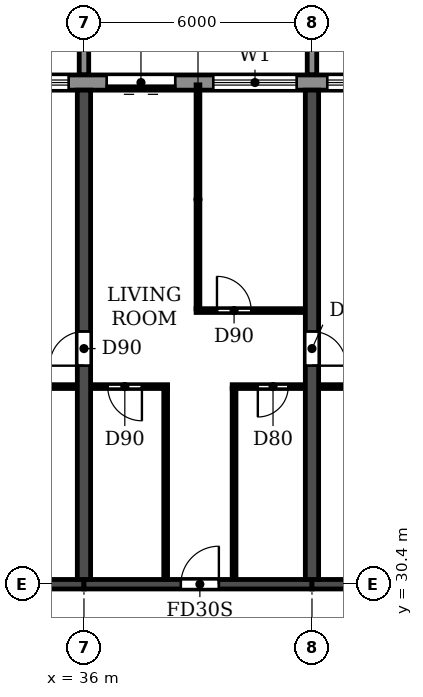
"""IFC4 building model, lengths in metres.
Left out: names, types, materials, properties, quantities, classifications, styles, units other than length and angle.
Written with IfcOpenShell. Run it as: python <this file> out.ifc"""

import sys

from ifc_helpers import new_model, si_unit, direction, frame, frame_2d, origin, place, context, subcontext, project, spatial, polyline, rectangle, outline, extrude, source, transform, mapped, element, fill, save


model = new_model("IFC4")
c1 = context("Model", 3, precision=1e-05, world=origin(), true_north=direction((0.0, 1.0)))
c2 = subcontext(c1, "Body", "Model", "MODEL_VIEW")
j1 = project(units=[si_unit("LENGTHUNIT", "METRE"), si_unit("PLANEANGLEUNIT", "RADIAN")], contexts=[c1])
p1 = place(None, origin())
s1 = spatial("IfcSite", under=j1, at=p1, CompositionType="ELEMENT")
p2 = place(p1, origin())
s2 = spatial("IfcBuilding", under=s1, at=p2, CompositionType="ELEMENT")
p3 = place(p2, frame((0.0, 0.0, 92.7)))
s3 = spatial("IfcBuildingStorey", under=s2, at=p3, CompositionType="ELEMENT", Elevation=92.7)
p4 = place(p3, frame((36.0, 30.525, 0.0), z_axis=(0.0, 0.0, 1.0), x_axis=(0.0, 1.0, 0.0)))
e1 = element("IfcWall", 1, at=p4, inside=s3, PredefinedType="SHEAR", context=c2, shape_type="SweptSolid", body=[
    extrude(rectangle(XDim=12.875, YDim=0.35, at=frame_2d((6.438, 0.0))), origin(), (0.0, 0.0, 1.0), 3.06),
])
p5 = place(p4, frame((5.625, 0.0, 0.0)))
e2 = element("IfcOpeningElement", 2, at=p5, cuts=e1, PredefinedType="OPENING", context=c2, shape_type="SweptSolid", body=[
    extrude(rectangle(XDim=0.9, YDim=2.1, at=frame_2d((0.45, 1.05))), frame((0.0, 0.185, 0.0), z_axis=(0.0, -1.0, 0.0), x_axis=(1.0, 0.0, 0.0)), (0.0, 0.0, 1.0), 0.37),
])
p6 = place(p3, frame((42.0, 30.525, 0.0), z_axis=(0.0, 0.0, 1.0), x_axis=(0.0, 1.0, 0.0)))
e3 = element("IfcWall", 3, at=p6, inside=s3, PredefinedType="SHEAR", context=c2, shape_type="SweptSolid", body=[
    extrude(rectangle(XDim=12.875, YDim=0.35, at=frame_2d((6.438, 0.0))), origin(), (0.0, 0.0, 1.0), 3.06),
])
p7 = place(p6, frame((5.625, 0.0, 0.0)))
e4 = element("IfcOpeningElement", 4, at=p7, cuts=e3, PredefinedType="OPENING", context=c2, shape_type="SweptSolid", body=[
    extrude(rectangle(XDim=0.9, YDim=2.1, at=frame_2d((0.45, 1.05))), frame((0.0, 0.185, 0.0), z_axis=(0.0, -1.0, 0.0), x_axis=(1.0, 0.0, 0.0)), (0.0, 0.0, 1.0), 0.37),
])
p8 = place(p3, frame((30.0, 30.4, 0.0), z_axis=(0.0, 0.0, 1.0), x_axis=(1.0, 0.0, 0.0)))
e5 = element("IfcWall", 5, at=p8, inside=s3, PredefinedType="SHEAR", context=c2, shape_type="SweptSolid", body=[
    extrude(rectangle(XDim=6.0, YDim=0.25, at=frame_2d((3.0, 0.0))), origin(), (0.0, 0.0, 1.0), 2.46),
])
p9 = place(p3, frame((36.0, 30.4, 0.0), z_axis=(0.0, 0.0, 1.0), x_axis=(1.0, 0.0, 0.0)))
e6 = element("IfcWall", 6, at=p9, inside=s3, PredefinedType="SHEAR", context=c2, shape_type="SweptSolid", body=[
    extrude(rectangle(XDim=6.0, YDim=0.25, at=frame_2d((3.0, 0.0))), origin(), (0.0, 0.0, 1.0), 2.46),
])
p10 = place(p9, frame((2.55, 0.0, 0.0)))
e7 = element("IfcOpeningElement", 7, at=p10, cuts=e6, PredefinedType="OPENING", context=c2, shape_type="SweptSolid", body=[
    extrude(rectangle(XDim=1.0, YDim=2.1, at=frame_2d((0.5, 1.05))), frame((0.0, 0.135, 0.0), z_axis=(0.0, -1.0, 0.0), x_axis=(1.0, 0.0, 0.0)), (0.0, 0.0, 1.0), 0.27),
])
p11 = place(p3, frame((42.0, 30.4, 0.0), z_axis=(0.0, 0.0, 1.0), x_axis=(1.0, 0.0, 0.0)))
e8 = element("IfcWall", 8, at=p11, inside=s3, PredefinedType="SHEAR", context=c2, shape_type="SweptSolid", body=[
    extrude(rectangle(XDim=6.0, YDim=0.25, at=frame_2d((3.0, 0.0))), origin(), (0.0, 0.0, 1.0), 2.46),
])
p12 = place(p3, frame((91.317, 43.6, 0.0), z_axis=(0.0, 0.0, 1.0), x_axis=(-1.0, 0.0, 0.0)))
e9 = element("IfcWall", 9, at=p12, inside=s3, PredefinedType="STANDARD", context=c2, shape_type="SweptSolid", body=[
    extrude(rectangle(XDim=80.634, YDim=0.4, at=frame_2d((40.317, 0.0))), origin(), (0.0, 0.0, 1.0), 3.06),
])
p13 = place(p12, frame((76.717, 0.0, 0.9)))
e10 = element("IfcOpeningElement", 10, at=p13, cuts=e9, PredefinedType="OPENING", context=c2, shape_type="SweptSolid", body=[
    extrude(rectangle(XDim=2.2, YDim=1.5, at=frame_2d((1.1, 0.75))), frame((0.0, 0.21, 0.0), z_axis=(0.0, -1.0, 0.0), x_axis=(1.0, 0.0, 0.0)), (0.0, 0.0, 1.0), 0.42),
])
p14 = place(p12, frame((73.917, 0.0, 0.0)))
e11 = element("IfcOpeningElement", 11, at=p14, cuts=e9, PredefinedType="OPENING", context=c2, shape_type="SweptSolid", body=[
    extrude(rectangle(XDim=1.8, YDim=2.4, at=frame_2d((0.9, 1.2))), frame((0.0, 0.21, 0.0), z_axis=(0.0, -1.0, 0.0), x_axis=(1.0, 0.0, 0.0)), (0.0, 0.0, 1.0), 0.42),
])
p15 = place(p12, frame((70.717, 0.0, 0.9)))
e12 = element("IfcOpeningElement", 12, at=p15, cuts=e9, PredefinedType="OPENING", context=c2, shape_type="SweptSolid", body=[
    extrude(rectangle(XDim=2.2, YDim=1.5, at=frame_2d((1.1, 0.75))), frame((0.0, 0.21, 0.0), z_axis=(0.0, -1.0, 0.0), x_axis=(1.0, 0.0, 0.0)), (0.0, 0.0, 1.0), 0.42),
])
p16 = place(p12, frame((67.717, 0.0, 0.9)))
e13 = element("IfcOpeningElement", 13, at=p16, cuts=e9, PredefinedType="OPENING", context=c2, shape_type="SweptSolid", body=[
    extrude(rectangle(XDim=2.2, YDim=1.5, at=frame_2d((1.1, 0.75))), frame((0.0, 0.21, 0.0), z_axis=(0.0, -1.0, 0.0), x_axis=(1.0, 0.0, 0.0)), (0.0, 0.0, 1.0), 0.42),
])
p17 = place(p12, frame((64.717, 0.0, 0.9)))
e14 = element("IfcOpeningElement", 14, at=p17, cuts=e9, PredefinedType="OPENING", context=c2, shape_type="SweptSolid", body=[
    extrude(rectangle(XDim=2.2, YDim=1.5, at=frame_2d((1.1, 0.75))), frame((0.0, 0.21, 0.0), z_axis=(0.0, -1.0, 0.0), x_axis=(1.0, 0.0, 0.0)), (0.0, 0.0, 1.0), 0.42),
])
p18 = place(p12, frame((61.917, 0.0, 0.0)))
e15 = element("IfcOpeningElement", 15, at=p18, cuts=e9, PredefinedType="OPENING", context=c2, shape_type="SweptSolid", body=[
    extrude(rectangle(XDim=1.8, YDim=2.4, at=frame_2d((0.9, 1.2))), frame((0.0, 0.21, 0.0), z_axis=(0.0, -1.0, 0.0), x_axis=(1.0, 0.0, 0.0)), (0.0, 0.0, 1.0), 0.42),
])
p19 = place(p12, frame((58.717, 0.0, 0.9)))
e16 = element("IfcOpeningElement", 16, at=p19, cuts=e9, PredefinedType="OPENING", context=c2, shape_type="SweptSolid", body=[
    extrude(rectangle(XDim=2.2, YDim=1.5, at=frame_2d((1.1, 0.75))), frame((0.0, 0.21, 0.0), z_axis=(0.0, -1.0, 0.0), x_axis=(1.0, 0.0, 0.0)), (0.0, 0.0, 1.0), 0.42),
])
p20 = place(p12, frame((55.717, 0.0, 0.9)))
e17 = element("IfcOpeningElement", 17, at=p20, cuts=e9, PredefinedType="OPENING", context=c2, shape_type="SweptSolid", body=[
    extrude(rectangle(XDim=2.2, YDim=1.5, at=frame_2d((1.1, 0.75))), frame((0.0, 0.21, 0.0), z_axis=(0.0, -1.0, 0.0), x_axis=(1.0, 0.0, 0.0)), (0.0, 0.0, 1.0), 0.42),
])
p21 = place(p12, frame((52.917, 0.0, 0.0)))
e18 = element("IfcOpeningElement", 18, at=p21, cuts=e9, PredefinedType="OPENING", context=c2, shape_type="SweptSolid", body=[
    extrude(rectangle(XDim=1.8, YDim=2.4, at=frame_2d((0.9, 1.2))), frame((0.0, 0.21, 0.0), z_axis=(0.0, -1.0, 0.0), x_axis=(1.0, 0.0, 0.0)), (0.0, 0.0, 1.0), 0.42),
])
p22 = place(p12, frame((49.717, 0.0, 0.9)))
e19 = element("IfcOpeningElement", 19, at=p22, cuts=e9, PredefinedType="OPENING", context=c2, shape_type="SweptSolid", body=[
    extrude(rectangle(XDim=2.2, YDim=1.5, at=frame_2d((1.1, 0.75))), frame((0.0, 0.21, 0.0), z_axis=(0.0, -1.0, 0.0), x_axis=(1.0, 0.0, 0.0)), (0.0, 0.0, 1.0), 0.42),
])
p23 = place(p12, frame((46.717, 0.0, 0.9)))
e20 = element("IfcOpeningElement", 20, at=p23, cuts=e9, PredefinedType="OPENING", context=c2, shape_type="SweptSolid", body=[
    extrude(rectangle(XDim=2.2, YDim=1.5, at=frame_2d((1.1, 0.75))), frame((0.0, 0.21, 0.0), z_axis=(0.0, -1.0, 0.0), x_axis=(1.0, 0.0, 0.0)), (0.0, 0.0, 1.0), 0.42),
])
p24 = place(p12, frame((43.717, 0.0, 0.9)))
e21 = element("IfcOpeningElement", 21, at=p24, cuts=e9, PredefinedType="OPENING", context=c2, shape_type="SweptSolid", body=[
    extrude(rectangle(XDim=2.2, YDim=1.5, at=frame_2d((1.1, 0.75))), frame((0.0, 0.21, 0.0), z_axis=(0.0, -1.0, 0.0), x_axis=(1.0, 0.0, 0.0)), (0.0, 0.0, 1.0), 0.42),
])
p25 = place(p12, frame((40.717, 0.0, 0.9)))
e22 = element("IfcOpeningElement", 22, at=p25, cuts=e9, PredefinedType="OPENING", context=c2, shape_type="SweptSolid", body=[
    extrude(rectangle(XDim=2.2, YDim=1.5, at=frame_2d((1.1, 0.75))), frame((0.0, 0.21, 0.0), z_axis=(0.0, -1.0, 0.0), x_axis=(1.0, 0.0, 0.0)), (0.0, 0.0, 1.0), 0.42),
])
p26 = place(p12, frame((37.917, 0.0, 0.0)))
e23 = element("IfcOpeningElement", 23, at=p26, cuts=e9, PredefinedType="OPENING", context=c2, shape_type="SweptSolid", body=[
    extrude(rectangle(XDim=1.8, YDim=2.4, at=frame_2d((0.9, 1.2))), frame((0.0, 0.21, 0.0), z_axis=(0.0, -1.0, 0.0), x_axis=(1.0, 0.0, 0.0)), (0.0, 0.0, 1.0), 0.42),
])
p27 = place(p12, frame((34.917, 0.0, 0.0)))
e24 = element("IfcOpeningElement", 24, at=p27, cuts=e9, PredefinedType="OPENING", context=c2, shape_type="SweptSolid", body=[
    extrude(rectangle(XDim=1.8, YDim=2.4, at=frame_2d((0.9, 1.2))), frame((0.0, 0.21, 0.0), z_axis=(0.0, -1.0, 0.0), x_axis=(1.0, 0.0, 0.0)), (0.0, 0.0, 1.0), 0.42),
])
p28 = place(p12, frame((31.717, 0.0, 0.9)))
e25 = element("IfcOpeningElement", 25, at=p28, cuts=e9, PredefinedType="OPENING", context=c2, shape_type="SweptSolid", body=[
    extrude(rectangle(XDim=2.2, YDim=1.5, at=frame_2d((1.1, 0.75))), frame((0.0, 0.21, 0.0), z_axis=(0.0, -1.0, 0.0), x_axis=(1.0, 0.0, 0.0)), (0.0, 0.0, 1.0), 0.42),
])
p29 = place(p12, frame((28.717, 0.0, 0.9)))
e26 = element("IfcOpeningElement", 26, at=p29, cuts=e9, PredefinedType="OPENING", context=c2, shape_type="SweptSolid", body=[
    extrude(rectangle(XDim=2.2, YDim=1.5, at=frame_2d((1.1, 0.75))), frame((0.0, 0.21, 0.0), z_axis=(0.0, -1.0, 0.0), x_axis=(1.0, 0.0, 0.0)), (0.0, 0.0, 1.0), 0.42),
])
p30 = place(p12, frame((25.717, 0.0, 0.9)))
e27 = element("IfcOpeningElement", 27, at=p30, cuts=e9, PredefinedType="OPENING", context=c2, shape_type="SweptSolid", body=[
    extrude(rectangle(XDim=2.2, YDim=1.5, at=frame_2d((1.1, 0.75))), frame((0.0, 0.21, 0.0), z_axis=(0.0, -1.0, 0.0), x_axis=(1.0, 0.0, 0.0)), (0.0, 0.0, 1.0), 0.42),
])
p31 = place(p12, frame((22.717, 0.0, 0.9)))
e28 = element("IfcOpeningElement", 28, at=p31, cuts=e9, PredefinedType="OPENING", context=c2, shape_type="SweptSolid", body=[
    extrude(rectangle(XDim=2.2, YDim=1.5, at=frame_2d((1.1, 0.75))), frame((0.0, 0.21, 0.0), z_axis=(0.0, -1.0, 0.0), x_axis=(1.0, 0.0, 0.0)), (0.0, 0.0, 1.0), 0.42),
])
p32 = place(p12, frame((19.917, 0.0, 0.0)))
e29 = element("IfcOpeningElement", 29, at=p32, cuts=e9, PredefinedType="OPENING", context=c2, shape_type="SweptSolid", body=[
    extrude(rectangle(XDim=1.8, YDim=2.4, at=frame_2d((0.9, 1.2))), frame((0.0, 0.21, 0.0), z_axis=(0.0, -1.0, 0.0), x_axis=(1.0, 0.0, 0.0)), (0.0, 0.0, 1.0), 0.42),
])
p33 = place(p12, frame((16.717, 0.0, 0.9)))
e30 = element("IfcOpeningElement", 30, at=p33, cuts=e9, PredefinedType="OPENING", context=c2, shape_type="SweptSolid", body=[
    extrude(rectangle(XDim=2.2, YDim=1.5, at=frame_2d((1.1, 0.75))), frame((0.0, 0.21, 0.0), z_axis=(0.0, -1.0, 0.0), x_axis=(1.0, 0.0, 0.0)), (0.0, 0.0, 1.0), 0.42),
])
p34 = place(p12, frame((13.917, 0.0, 0.0)))
e31 = element("IfcOpeningElement", 31, at=p34, cuts=e9, PredefinedType="OPENING", context=c2, shape_type="SweptSolid", body=[
    extrude(rectangle(XDim=1.8, YDim=2.4, at=frame_2d((0.9, 1.2))), frame((0.0, 0.21, 0.0), z_axis=(0.0, -1.0, 0.0), x_axis=(1.0, 0.0, 0.0)), (0.0, 0.0, 1.0), 0.42),
])
p35 = place(p12, frame((10.717, 0.0, 0.9)))
e32 = element("IfcOpeningElement", 32, at=p35, cuts=e9, PredefinedType="OPENING", context=c2, shape_type="SweptSolid", body=[
    extrude(rectangle(XDim=2.2, YDim=1.5, at=frame_2d((1.1, 0.75))), frame((0.0, 0.21, 0.0), z_axis=(0.0, -1.0, 0.0), x_axis=(1.0, 0.0, 0.0)), (0.0, 0.0, 1.0), 0.42),
])
p36 = place(p12, frame((7.917, 0.0, 0.0)))
e33 = element("IfcOpeningElement", 33, at=p36, cuts=e9, PredefinedType="OPENING", context=c2, shape_type="SweptSolid", body=[
    extrude(rectangle(XDim=1.8, YDim=2.4, at=frame_2d((0.9, 1.2))), frame((0.0, 0.21, 0.0), z_axis=(0.0, -1.0, 0.0), x_axis=(1.0, 0.0, 0.0)), (0.0, 0.0, 1.0), 0.42),
])
p37 = place(p12, frame((4.717, 0.0, 0.9)))
e34 = element("IfcOpeningElement", 34, at=p37, cuts=e9, PredefinedType="OPENING", context=c2, shape_type="SweptSolid", body=[
    extrude(rectangle(XDim=2.2, YDim=1.5, at=frame_2d((1.1, 0.75))), frame((0.0, 0.21, 0.0), z_axis=(0.0, -1.0, 0.0), x_axis=(1.0, 0.0, 0.0)), (0.0, 0.0, 1.0), 0.42),
])
p38 = place(p12, frame((1.917, 0.0, 0.0)))
e35 = element("IfcOpeningElement", 35, at=p38, cuts=e9, PredefinedType="OPENING", context=c2, shape_type="SweptSolid", body=[
    extrude(rectangle(XDim=1.8, YDim=2.4, at=frame_2d((0.9, 1.2))), frame((0.0, 0.21, 0.0), z_axis=(0.0, -1.0, 0.0), x_axis=(1.0, 0.0, 0.0)), (0.0, 0.0, 1.0), 0.42),
])
m1 = source(origin(), c2, "Body", "SweptSolid", [
    extrude(outline(polyline([(0.0, 0.0), (0.25, 0.0), (0.25, 3.1), (0.0, 3.1), (0.0, 0.0)])), origin(), (0.0, 0.0, 1.0), 3.1),
])
for number, where in (
    (36, (35.875, 43.8, 0.0)),
    (37, (41.875, 43.8, 0.0)),
):
    element("IfcWall", number, at=place(p3, frame(where)), inside=s3, PredefinedType="STANDARD", context=c2, shape_type="MappedRepresentation", body=[
        mapped(m1, transform((0.0, 0.0, 0.0))),
    ])
p39 = place(p3, frame((33.1, 35.6, 0.0), z_axis=(0.0, 0.0, 1.0), x_axis=(1.0, 0.0, 0.0)))
e38 = element("IfcWall", 38, at=p39, inside=s3, PredefinedType="PARTITIONING", context=c2, shape_type="SweptSolid", body=[
    extrude(rectangle(XDim=2.715, YDim=0.1, at=frame_2d((1.357, 0.0))), origin(), (0.0, 0.0, 1.0), 3.06),
])
p40 = place(p39, frame((1.0, 0.0, 0.0)))
e39 = element("IfcOpeningElement", 39, at=p40, cuts=e38, PredefinedType="OPENING", context=c2, shape_type="SweptSolid", body=[
    extrude(rectangle(XDim=0.8, YDim=2.1, at=frame_2d((0.4, 1.05))), frame((0.0, 0.06, 0.0), z_axis=(0.0, -1.0, 0.0), x_axis=(1.0, 0.0, 0.0)), (0.0, 0.0, 1.0), 0.12),
])
p41 = place(p3, frame((36.185, 35.6, 0.0), z_axis=(0.0, 0.0, 1.0), x_axis=(1.0, 0.0, 0.0)))
e40 = element("IfcWall", 40, at=p41, inside=s3, PredefinedType="PARTITIONING", context=c2, shape_type="SweptSolid", body=[
    extrude(rectangle(XDim=2.015, YDim=0.1, at=frame_2d((1.007, 0.0))), origin(), (0.0, 0.0, 1.0), 3.06),
])
p42 = place(p41, frame((0.44, 0.0, 0.0)))
e41 = element("IfcOpeningElement", 41, at=p42, cuts=e40, PredefinedType="OPENING", context=c2, shape_type="SweptSolid", body=[
    extrude(rectangle(XDim=0.9, YDim=2.1, at=frame_2d((0.45, 1.05))), frame((0.0, 0.06, 0.0), z_axis=(0.0, -1.0, 0.0), x_axis=(1.0, 0.0, 0.0)), (0.0, 0.0, 1.0), 0.12),
])
p43 = place(p3, frame((39.9, 35.6, 0.0), z_axis=(0.0, 0.0, 1.0), x_axis=(1.0, 0.0, 0.0)))
e42 = element("IfcWall", 42, at=p43, inside=s3, PredefinedType="PARTITIONING", context=c2, shape_type="SweptSolid", body=[
    extrude(rectangle(XDim=1.915, YDim=0.1, at=frame_2d((0.958, 0.0))), origin(), (0.0, 0.0, 1.0), 3.06),
])
p44 = place(p43, frame((0.675, 0.0, 0.0)))
e43 = element("IfcOpeningElement", 43, at=p44, cuts=e42, PredefinedType="OPENING", context=c2, shape_type="SweptSolid", body=[
    extrude(rectangle(XDim=0.8, YDim=2.1, at=frame_2d((0.4, 1.05))), frame((0.0, 0.06, 0.0), z_axis=(0.0, -1.0, 0.0), x_axis=(1.0, 0.0, 0.0)), (0.0, 0.0, 1.0), 0.12),
])
p45 = place(p3, frame((42.185, 35.6, 0.0), z_axis=(0.0, 0.0, 1.0), x_axis=(1.0, 0.0, 0.0)))
e44 = element("IfcWall", 44, at=p45, inside=s3, PredefinedType="PARTITIONING", context=c2, shape_type="SweptSolid", body=[
    extrude(rectangle(XDim=2.715, YDim=0.1, at=frame_2d((1.357, 0.0))), origin(), (0.0, 0.0, 1.0), 3.06),
])
p46 = place(p45, frame((0.915, 0.0, 0.0)))
e45 = element("IfcOpeningElement", 45, at=p46, cuts=e44, PredefinedType="OPENING", context=c2, shape_type="SweptSolid", body=[
    extrude(rectangle(XDim=0.8, YDim=2.1, at=frame_2d((0.4, 1.05))), frame((0.0, 0.06, 0.0), z_axis=(0.0, -1.0, 0.0), x_axis=(1.0, 0.0, 0.0)), (0.0, 0.0, 1.0), 0.12),
])
p47 = place(p3, frame((38.95, 37.6, 0.0), z_axis=(0.0, 0.0, 1.0), x_axis=(1.0, 0.0, 0.0)))
e46 = element("IfcWall", 46, at=p47, inside=s3, PredefinedType="PARTITIONING", context=c2, shape_type="SweptSolid", body=[
    extrude(rectangle(XDim=2.865, YDim=0.1, at=frame_2d((1.433, 0.0))), origin(), (0.0, 0.0, 1.0), 3.06),
])
p48 = place(p47, frame((0.55, 0.0, 0.0)))
e47 = element("IfcOpeningElement", 47, at=p48, cuts=e46, PredefinedType="OPENING", context=c2, shape_type="SweptSolid", body=[
    extrude(rectangle(XDim=0.9, YDim=2.1, at=frame_2d((0.45, 1.05))), frame((0.0, 0.06, 0.0), z_axis=(0.0, -1.0, 0.0), x_axis=(1.0, 0.0, 0.0)), (0.0, 0.0, 1.0), 0.12),
])
p49 = place(p3, frame((38.15, 30.535, 0.0), z_axis=(0.0, 0.0, 1.0), x_axis=(0.0, 1.0, 0.0)))
e48 = element("IfcWall", 48, at=p49, inside=s3, PredefinedType="PARTITIONING", context=c2, shape_type="SweptSolid", body=[
    extrude(rectangle(XDim=5.015, YDim=0.1, at=frame_2d((2.508, 0.0))), origin(), (0.0, 0.0, 1.0), 3.06),
])
p50 = place(p3, frame((39.0, 37.65, 0.0), z_axis=(0.0, 0.0, 1.0), x_axis=(0.0, 1.0, 0.0)))
e49 = element("IfcWall", 49, at=p50, inside=s3, PredefinedType="PARTITIONING", context=c2, shape_type="SweptSolid", body=[
    extrude(rectangle(XDim=5.89, YDim=0.1, at=frame_2d((2.945, 0.0))), origin(), (0.0, 0.0, 1.0), 3.06),
])
p51 = place(p3, frame((39.95, 30.535, 0.0), z_axis=(0.0, 0.0, 1.0), x_axis=(0.0, 1.0, 0.0)))
e50 = element("IfcWall", 50, at=p51, inside=s3, PredefinedType="PARTITIONING", context=c2, shape_type="SweptSolid", body=[
    extrude(rectangle(XDim=5.015, YDim=0.1, at=frame_2d((2.508, 0.0))), origin(), (0.0, 0.0, 1.0), 3.06),
])
p52 = place(p20, origin())
e51 = element("IfcWindow", 51, at=p52, inside=s3, PartitioningType="DOUBLE_PANEL_HORIZONTAL", PredefinedType="WINDOW", context=c2, shape_type="SweptSolid", body=[
    extrude(rectangle(XDim=2.2, YDim=1.5, at=frame_2d((1.1, 0.75))), frame((0.0, 0.03, 0.0), z_axis=(0.0, -1.0, 0.0), x_axis=(1.0, 0.0, 0.0)), (0.0, 0.0, 1.0), 0.06),
])
fill(e17, e51)
p53 = place(p21, origin())
e52 = element("IfcDoor", 52, at=p53, inside=s3, OperationType="DOUBLE_DOOR_SLIDING", PredefinedType="DOOR", context=c2, shape_type="SweptSolid", body=[
    extrude(rectangle(XDim=1.8, YDim=2.4, at=frame_2d((0.9, 1.2))), frame((0.0, 0.025, 0.0), z_axis=(0.0, -1.0, 0.0), x_axis=(1.0, 0.0, 0.0)), (0.0, 0.0, 1.0), 0.05),
])
fill(e18, e52)
p54 = place(p22, origin())
e53 = element("IfcWindow", 53, at=p54, inside=s3, PartitioningType="DOUBLE_PANEL_HORIZONTAL", PredefinedType="WINDOW", context=c2, shape_type="SweptSolid", body=[
    extrude(rectangle(XDim=2.2, YDim=1.5, at=frame_2d((1.1, 0.75))), frame((0.0, 0.03, 0.0), z_axis=(0.0, -1.0, 0.0), x_axis=(1.0, 0.0, 0.0)), (0.0, 0.0, 1.0), 0.06),
])
fill(e19, e53)
p55 = place(p23, origin())
e54 = element("IfcWindow", 54, at=p55, inside=s3, PartitioningType="DOUBLE_PANEL_HORIZONTAL", PredefinedType="WINDOW", context=c2, shape_type="SweptSolid", body=[
    extrude(rectangle(XDim=2.2, YDim=1.5, at=frame_2d((1.1, 0.75))), frame((0.0, 0.03, 0.0), z_axis=(0.0, -1.0, 0.0), x_axis=(1.0, 0.0, 0.0)), (0.0, 0.0, 1.0), 0.06),
])
fill(e20, e54)
p56 = place(p5, origin())
e55 = element("IfcDoor", 55, at=p56, inside=s3, OperationType="SINGLE_SWING_LEFT", PredefinedType="DOOR", context=c2, shape_type="SweptSolid", body=[
    extrude(rectangle(XDim=0.9, YDim=2.1, at=frame_2d((0.45, 1.05))), frame((0.0, 0.025, 0.0), z_axis=(0.0, -1.0, 0.0), x_axis=(1.0, 0.0, 0.0)), (0.0, 0.0, 1.0), 0.05),
])
fill(e2, e55)
p57 = place(p42, frame((0.9, 0.0, 0.0), z_axis=(0.0, 0.0, 1.0), x_axis=(-1.0, 0.0, 0.0)))
e56 = element("IfcDoor", 56, at=p57, inside=s3, OperationType="SINGLE_SWING_LEFT", PredefinedType="DOOR", context=c2, shape_type="SweptSolid", body=[
    extrude(rectangle(XDim=0.9, YDim=2.1, at=frame_2d((0.45, 1.05))), frame((0.0, 0.025, 0.0), z_axis=(0.0, -1.0, 0.0), x_axis=(1.0, 0.0, 0.0)), (0.0, 0.0, 1.0), 0.05),
])
fill(e41, e56)
p58 = place(p10, origin())
e57 = element("IfcDoor", 57, at=p58, inside=s3, OperationType="SINGLE_SWING_RIGHT", PredefinedType="DOOR", context=c2, shape_type="SweptSolid", body=[
    extrude(rectangle(XDim=1.0, YDim=2.1, at=frame_2d((0.5, 1.05))), frame((0.0, 0.025, 0.0), z_axis=(0.0, -1.0, 0.0), x_axis=(1.0, 0.0, 0.0)), (0.0, 0.0, 1.0), 0.05),
])
fill(e7, e57)
p59 = place(p48, origin())
e58 = element("IfcDoor", 58, at=p59, inside=s3, OperationType="SINGLE_SWING_LEFT", PredefinedType="DOOR", context=c2, shape_type="SweptSolid", body=[
    extrude(rectangle(XDim=0.9, YDim=2.1, at=frame_2d((0.45, 1.05))), frame((0.0, 0.025, 0.0), z_axis=(0.0, -1.0, 0.0), x_axis=(1.0, 0.0, 0.0)), (0.0, 0.0, 1.0), 0.05),
])
fill(e47, e58)
p60 = place(p44, frame((0.8, 0.0, 0.0), z_axis=(0.0, 0.0, 1.0), x_axis=(-1.0, 0.0, 0.0)))
e59 = element("IfcDoor", 59, at=p60, inside=s3, OperationType="SINGLE_SWING_RIGHT", PredefinedType="DOOR", context=c2, shape_type="SweptSolid", body=[
    extrude(rectangle(XDim=0.8, YDim=2.1, at=frame_2d((0.4, 1.05))), frame((0.0, 0.025, 0.0), z_axis=(0.0, -1.0, 0.0), x_axis=(1.0, 0.0, 0.0)), (0.0, 0.0, 1.0), 0.05),
])
fill(e43, e59)
p61 = place(p7, frame((0.9, 0.0, 0.0), z_axis=(0.0, 0.0, 1.0), x_axis=(-1.0, 0.0, 0.0)))
e60 = element("IfcDoor", 60, at=p61, inside=s3, OperationType="SINGLE_SWING_RIGHT", PredefinedType="DOOR", context=c2, shape_type="SweptSolid", body=[
    extrude(rectangle(XDim=0.9, YDim=2.1, at=frame_2d((0.45, 1.05))), frame((0.0, 0.025, 0.0), z_axis=(0.0, -1.0, 0.0), x_axis=(1.0, 0.0, 0.0)), (0.0, 0.0, 1.0), 0.05),
])
fill(e4, e60)
save(model, sys.argv[1])
